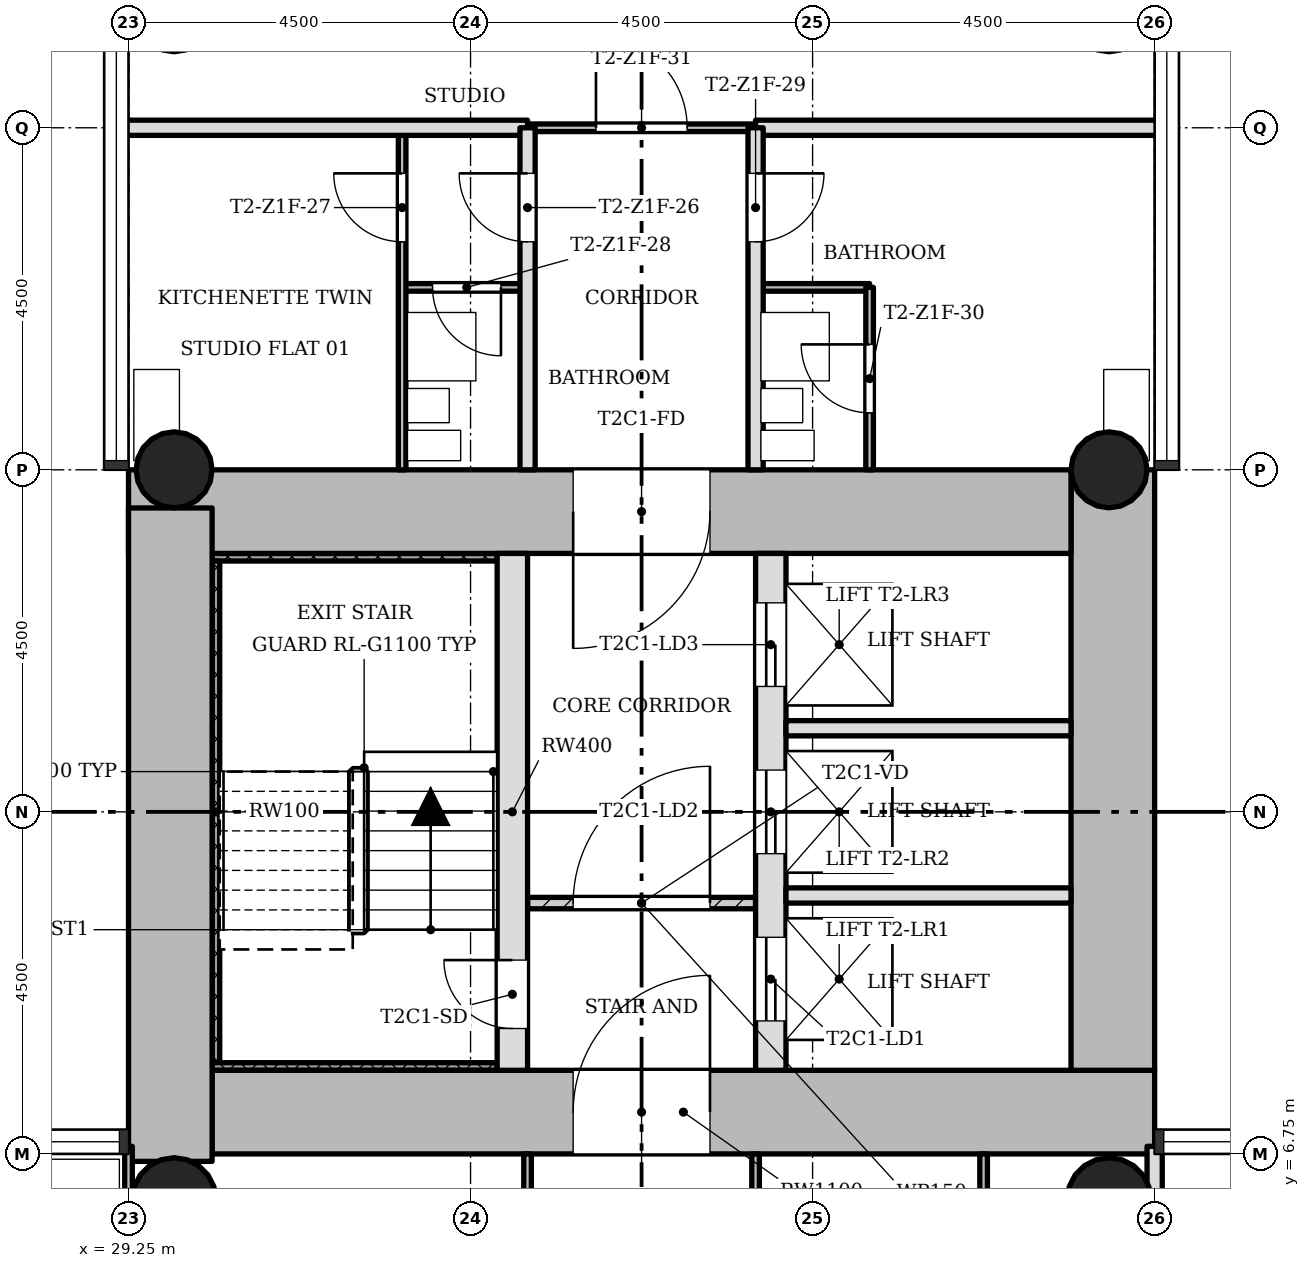
"""IFC4 building model, lengths in metres.
Left out: names, types, materials, properties, quantities, classifications, styles, units other than length and angle.
Written with IfcOpenShell. Run it as: python <this file> out.ifc"""

import sys

from ifc_helpers import new_model, si_unit, direction, frame, frame_2d, origin, origin_2d, place, context, subcontext, project, spatial, rectangle, hollow_circle, extrude, element, fill, save


model = new_model("IFC4")
c1 = context("Model", 3, precision=1e-05, world=origin(), true_north=direction((0.0, 1.0)))
c2 = subcontext(c1, "Body", "Model", "MODEL_VIEW")
j1 = project(units=[si_unit("LENGTHUNIT", "METRE"), si_unit("PLANEANGLEUNIT", "RADIAN")], contexts=[c1])
p1 = place(None, origin())
s1 = spatial("IfcSite", under=j1, at=p1, CompositionType="ELEMENT")
p2 = place(p1, origin())
s2 = spatial("IfcBuilding", under=s1, at=p2, CompositionType="ELEMENT")
p3 = place(p2, frame((0.0, 0.0, 68.7)))
s3 = spatial("IfcBuildingStorey", under=s2, at=p3, CompositionType="ELEMENT", Elevation=68.7)
p4 = place(p3, frame((30.35, 7.3, 0.0), z_axis=(0.0, 0.0, 1.0), x_axis=(1.0, 0.0, 0.0)))
e1 = element("IfcWall", 1, at=p4, inside=s3, PredefinedType="SHEAR", context=c2, shape_type="SweptSolid", body=[
    extrude(rectangle(XDim=12.4, YDim=1.1, at=frame_2d((6.2, 0.0))), origin(), (0.0, 0.0, 1.0), 3.4),
])
p5 = place(p4, frame((4.75, 0.0, 0.0)))
e2 = element("IfcOpeningElement", 2, at=p5, cuts=e1, PredefinedType="OPENING", context=c2, shape_type="SweptSolid", body=[
    extrude(rectangle(XDim=1.8, YDim=2.1, at=frame_2d((0.9, 1.05))), frame((0.0, 0.56, 0.0), z_axis=(0.0, -1.0, 0.0), x_axis=(1.0, 0.0, 0.0)), (0.0, 0.0, 1.0), 1.12),
])
p6 = place(p3, frame((42.2, 7.85, 0.0), z_axis=(0.0, 0.0, 1.0), x_axis=(0.0, 1.0, 0.0)))
e3 = element("IfcWall", 3, at=p6, inside=s3, PredefinedType="SHEAR", context=c2, shape_type="SweptSolid", body=[
    extrude(rectangle(XDim=7.9, YDim=1.1, at=frame_2d((3.95, 0.0))), origin(), (0.0, 0.0, 1.0), 3.4),
])
p7 = place(p3, frame((41.65, 15.2, 0.0), z_axis=(0.0, 0.0, 1.0), x_axis=(-1.0, 0.0, 0.0)))
e4 = element("IfcWall", 4, at=p7, inside=s3, PredefinedType="SHEAR", context=c2, shape_type="SweptSolid", body=[
    extrude(rectangle(XDim=12.4, YDim=1.1, at=frame_2d((6.2, 0.0))), origin(), (0.0, 0.0, 1.0), 3.4),
])
p8 = place(p7, frame((4.75, 0.0, 0.0)))
e5 = element("IfcOpeningElement", 5, at=p8, cuts=e4, PredefinedType="OPENING", context=c2, shape_type="SweptSolid", body=[
    extrude(rectangle(XDim=1.8, YDim=2.1, at=frame_2d((0.9, 1.05))), frame((0.0, 0.56, 0.0), z_axis=(0.0, -1.0, 0.0), x_axis=(1.0, 0.0, 0.0)), (0.0, 0.0, 1.0), 1.12),
])
p9 = place(p3, frame((29.8, 15.248, 0.0), z_axis=(0.0, 0.0, 1.0), x_axis=(0.0, -1.0, 0.0)))
e6 = element("IfcWall", 6, at=p9, inside=s3, PredefinedType="SHEAR", context=c2, shape_type="SweptSolid", body=[
    extrude(rectangle(XDim=8.596, YDim=1.1, at=frame_2d((4.298, 0.0))), origin(), (0.0, 0.0, 1.0), 3.4),
])
p10 = place(p3, frame((34.3, 7.85, 0.0), z_axis=(0.0, 0.0, 1.0), x_axis=(0.0, 1.0, 0.0)))
e7 = element("IfcWall", 7, at=p10, inside=s3, PredefinedType="SHEAR", context=c2, shape_type="SweptSolid", body=[
    extrude(rectangle(XDim=6.8, YDim=0.4, at=frame_2d((3.4, 0.0))), origin(), (0.0, 0.0, 1.0), 3.4),
])
p11 = place(p10, frame((0.55, 0.0, 0.0)))
e8 = element("IfcOpeningElement", 8, at=p11, cuts=e7, PredefinedType="OPENING", context=c2, shape_type="SweptSolid", body=[
    extrude(rectangle(XDim=0.9, YDim=2.1, at=frame_2d((0.45, 1.05))), frame((0.0, 0.21, 0.0), z_axis=(0.0, -1.0, 0.0), x_axis=(1.0, 0.0, 0.0)), (0.0, 0.0, 1.0), 0.42),
])
p12 = place(p3, frame((37.7, 7.85, 0.0), z_axis=(0.0, 0.0, 1.0), x_axis=(0.0, 1.0, 0.0)))
e9 = element("IfcWall", 9, at=p12, inside=s3, PredefinedType="SHEAR", context=c2, shape_type="SweptSolid", body=[
    extrude(rectangle(XDim=6.8, YDim=0.4, at=frame_2d((3.4, 0.0))), origin(), (0.0, 0.0, 1.0), 3.4),
])
p13 = place(p12, frame((0.65, 0.0, 0.0)))
e10 = element("IfcOpeningElement", 10, at=p13, cuts=e9, PredefinedType="OPENING", context=c2, shape_type="SweptSolid", body=[
    extrude(rectangle(XDim=1.1, YDim=2.1, at=frame_2d((0.55, 1.05))), frame((0.0, 0.21, 0.0), z_axis=(0.0, -1.0, 0.0), x_axis=(1.0, 0.0, 0.0)), (0.0, 0.0, 1.0), 0.42),
])
p14 = place(p12, frame((2.85, 0.0, 0.0)))
e11 = element("IfcOpeningElement", 11, at=p14, cuts=e9, PredefinedType="OPENING", context=c2, shape_type="SweptSolid", body=[
    extrude(rectangle(XDim=1.1, YDim=2.1, at=frame_2d((0.55, 1.05))), frame((0.0, 0.21, 0.0), z_axis=(0.0, -1.0, 0.0), x_axis=(1.0, 0.0, 0.0)), (0.0, 0.0, 1.0), 0.42),
])
p15 = place(p12, frame((5.05, 0.0, 0.0)))
e12 = element("IfcOpeningElement", 12, at=p15, cuts=e9, PredefinedType="OPENING", context=c2, shape_type="SweptSolid", body=[
    extrude(rectangle(XDim=1.1, YDim=2.1, at=frame_2d((0.55, 1.05))), frame((0.0, 0.21, 0.0), z_axis=(0.0, -1.0, 0.0), x_axis=(1.0, 0.0, 0.0)), (0.0, 0.0, 1.0), 0.42),
])
for number, where, z_axis, x_axis in (
    (13, (42.15, 15.75, 0.0), (0.0, 0.0, 1.0), (1.0, 0.0, 0.0)),
    (14, (29.85, 15.75, 0.0), (0.0, 0.0, 1.0), (1.0, 0.0, 0.0)),
):
    element("IfcColumn", number, at=place(p3, frame(where, z_axis=z_axis, x_axis=x_axis)), inside=s3, PredefinedType="COLUMN", context=c2, shape_type="SweptSolid", body=[
        extrude(hollow_circle(Radius=0.5, WallThickness=0.036, at=origin_2d()), origin(), (0.0, 0.0, 1.0), 3.4),
    ])
for number, where, z_axis, x_axis in (
    (15, (42.15, 6.15, 0.0), (0.0, 0.0, 1.0), (1.0, 0.0, 0.0)),
    (16, (29.85, 6.15, 0.0), (0.0, 0.0, 1.0), (1.0, 0.0, 0.0)),
):
    element("IfcColumn", number, at=place(p3, frame(where, z_axis=z_axis, x_axis=x_axis)), inside=s3, PredefinedType="COLUMN", context=c2, shape_type="SweptSolid", body=[
        extrude(hollow_circle(Radius=0.55, WallThickness=0.04, at=origin_2d()), origin(), (0.0, 0.0, 1.0), 3.4),
    ])
p16 = place(p3, frame((37.5, 10.05, 0.0), z_axis=(0.0, 0.0, 1.0), x_axis=(-1.0, 0.0, 0.0)))
e17 = element("IfcWall", 17, at=p16, inside=s3, PredefinedType="PARTITIONING", context=c2, shape_type="SweptSolid", body=[
    extrude(rectangle(XDim=3.0, YDim=0.15, at=frame_2d((1.5, 0.0))), origin(), (0.0, 0.0, 1.0), 3.0),
])
p17 = place(p16, frame((0.6, 0.0, 0.0)))
e18 = element("IfcOpeningElement", 18, at=p17, cuts=e17, PredefinedType="OPENING", context=c2, shape_type="SweptSolid", body=[
    extrude(rectangle(XDim=1.8, YDim=2.1, at=frame_2d((0.9, 1.05))), frame((0.0, 0.085, 0.0), z_axis=(0.0, -1.0, 0.0), x_axis=(1.0, 0.0, 0.0)), (0.0, 0.0, 1.0), 0.17),
])
for number, where, z_axis, x_axis in (
    (19, (41.65, 10.15, 0.0), (0.0, 0.0, 1.0), (-1.0, 0.0, 0.0)),
    (20, (41.65, 12.35, 0.0), (0.0, 0.0, 1.0), (-1.0, 0.0, 0.0)),
):
    element("IfcWall", number, at=place(p3, frame(where, z_axis=z_axis, x_axis=x_axis)), inside=s3, PredefinedType="SOLIDWALL", context=c2, shape_type="SweptSolid", body=[
        extrude(rectangle(XDim=3.75, YDim=0.2, at=frame_2d((1.875, 0.0))), origin(), (0.0, 0.0, 1.0), 3.0),
    ])
p18 = place(p3, frame((39.0, 18.15, 0.0), z_axis=(0.0, 0.0, 1.0), x_axis=(-1.0, 0.0, 0.0)))
e21 = element("IfcWall", 21, at=p18, inside=s3, PredefinedType="PARTITIONING", context=c2, shape_type="SweptSolid", body=[
    extrude(rectangle(XDim=1.5, YDim=0.1, at=frame_2d((0.75, 0.0))), origin(), (0.0, 0.0, 1.0), 3.0),
])
p19 = place(p3, frame((34.5, 18.15, 0.0), z_axis=(0.0, 0.0, 1.0), x_axis=(-1.0, 0.0, 0.0)))
e22 = element("IfcWall", 22, at=p19, inside=s3, PredefinedType="PARTITIONING", context=c2, shape_type="SweptSolid", body=[
    extrude(rectangle(XDim=1.65, YDim=0.1, at=frame_2d((0.825, 0.0))), origin(), (0.0, 0.0, 1.0), 3.0),
])
p20 = place(p19, frame((0.35, 0.0, 0.0)))
e23 = element("IfcOpeningElement", 23, at=p20, cuts=e22, PredefinedType="OPENING", context=c2, shape_type="SweptSolid", body=[
    extrude(rectangle(XDim=0.9, YDim=2.1, at=frame_2d((0.45, 1.05))), frame((0.0, 0.06, 0.0), z_axis=(0.0, -1.0, 0.0), x_axis=(1.0, 0.0, 0.0)), (0.0, 0.0, 1.0), 0.12),
])
p21 = place(p3, frame((37.5, 20.25, 0.0), z_axis=(0.0, 0.0, 1.0), x_axis=(-1.0, 0.0, 0.0)))
e24 = element("IfcWall", 24, at=p21, inside=s3, PredefinedType="PARTITIONING", context=c2, shape_type="SweptSolid", body=[
    extrude(rectangle(XDim=3.0, YDim=0.1, at=frame_2d((1.5, 0.0))), origin(), (0.0, 0.0, 1.0), 3.0),
])
p22 = place(p21, frame((0.9, 0.0, 0.0)))
e25 = element("IfcOpeningElement", 25, at=p22, cuts=e24, PredefinedType="OPENING", context=c2, shape_type="SweptSolid", body=[
    extrude(rectangle(XDim=1.2, YDim=2.1, at=frame_2d((0.6, 1.05))), frame((0.0, 0.06, 0.0), z_axis=(0.0, -1.0, 0.0), x_axis=(1.0, 0.0, 0.0)), (0.0, 0.0, 1.0), 0.12),
])
for number, where, z_axis, x_axis in (
    (26, (42.85, 20.25, 0.0), (0.0, 0.0, 1.0), (-1.0, 0.0, 0.0)),
    (27, (34.5, 20.25, 0.0), (0.0, 0.0, 1.0), (-1.0, 0.0, 0.0)),
):
    element("IfcWall", number, at=place(p3, frame(where, z_axis=z_axis, x_axis=x_axis)), inside=s3, PredefinedType="SOLIDWALL", context=c2, shape_type="SweptSolid", body=[
        extrude(rectangle(XDim=5.35, YDim=0.2, at=frame_2d((2.675, 0.0))), origin(), (0.0, 0.0, 1.0), 3.0),
    ])
p23 = place(p3, frame((42.75, -6.85, 0.0), z_axis=(0.0, 0.0, 1.0), x_axis=(0.0, 1.0, 0.0)))
e28 = element("IfcWall", 28, at=p23, inside=s3, PredefinedType="SOLIDWALL", context=c2, shape_type="SweptSolid", body=[
    extrude(rectangle(XDim=13.7, YDim=0.2, at=frame_2d((6.85, 0.0))), origin(), (0.0, 0.0, 1.0), 3.0),
])
p24 = place(p23, frame((6.4, 0.0, 0.0)))
e29 = element("IfcOpeningElement", 29, at=p24, cuts=e28, PredefinedType="OPENING", context=c2, shape_type="SweptSolid", body=[
    extrude(rectangle(XDim=0.9, YDim=2.1, at=frame_2d((0.45, 1.05))), frame((0.0, 0.11, 0.0), z_axis=(0.0, -1.0, 0.0), x_axis=(1.0, 0.0, 0.0)), (0.0, 0.0, 1.0), 0.22),
])
p25 = place(p3, frame((40.5, 0.9, 0.0), z_axis=(0.0, 0.0, 1.0), x_axis=(0.0, 1.0, 0.0)))
e30 = element("IfcWall", 30, at=p25, inside=s3, PredefinedType="PARTITIONING", context=c2, shape_type="SweptSolid", body=[
    extrude(rectangle(XDim=5.85, YDim=0.1, at=frame_2d((2.925, 0.0))), origin(), (0.0, 0.0, 1.0), 3.0),
])
p26 = place(p3, frame((39.0, 15.75, 0.0), z_axis=(0.0, 0.0, 1.0), x_axis=(0.0, 1.0, 0.0)))
e31 = element("IfcWall", 31, at=p26, inside=s3, PredefinedType="PARTITIONING", context=c2, shape_type="SweptSolid", body=[
    extrude(rectangle(XDim=2.4, YDim=0.1, at=frame_2d((1.2, 0.0))), origin(), (0.0, 0.0, 1.0), 3.0),
])
p27 = place(p26, frame((0.75, 0.0, 0.0)))
e32 = element("IfcOpeningElement", 32, at=p27, cuts=e31, PredefinedType="OPENING", context=c2, shape_type="SweptSolid", body=[
    extrude(rectangle(XDim=0.9, YDim=2.1, at=frame_2d((0.45, 1.05))), frame((0.0, 0.06, 0.0), z_axis=(0.0, -1.0, 0.0), x_axis=(1.0, 0.0, 0.0)), (0.0, 0.0, 1.0), 0.12),
])
p28 = place(p3, frame((37.5, 0.9, 0.0), z_axis=(0.0, 0.0, 1.0), x_axis=(0.0, 1.0, 0.0)))
e33 = element("IfcWall", 33, at=p28, inside=s3, PredefinedType="PARTITIONING", context=c2, shape_type="SweptSolid", body=[
    extrude(rectangle(XDim=5.85, YDim=0.1, at=frame_2d((2.925, 0.0))), origin(), (0.0, 0.0, 1.0), 3.0),
])
p29 = place(p28, frame((2.475, 0.0, 0.0)))
e34 = element("IfcOpeningElement", 34, at=p29, cuts=e33, PredefinedType="OPENING", context=c2, shape_type="SweptSolid", body=[
    extrude(rectangle(XDim=0.9, YDim=2.1, at=frame_2d((0.45, 1.05))), frame((0.0, 0.06, 0.0), z_axis=(0.0, -1.0, 0.0), x_axis=(1.0, 0.0, 0.0)), (0.0, 0.0, 1.0), 0.12),
])
p30 = place(p3, frame((37.5, 15.75, 0.0), z_axis=(0.0, 0.0, 1.0), x_axis=(0.0, 1.0, 0.0)))
e35 = element("IfcWall", 35, at=p30, inside=s3, PredefinedType="SOLIDWALL", context=c2, shape_type="SweptSolid", body=[
    extrude(rectangle(XDim=4.5, YDim=0.2, at=frame_2d((2.25, 0.0))), origin(), (0.0, 0.0, 1.0), 3.0),
])
p31 = place(p30, frame((3.0, 0.0, 0.0)))
e36 = element("IfcOpeningElement", 36, at=p31, cuts=e35, PredefinedType="OPENING", context=c2, shape_type="SweptSolid", body=[
    extrude(rectangle(XDim=0.9, YDim=2.1, at=frame_2d((0.45, 1.05))), frame((0.0, 0.11, 0.0), z_axis=(0.0, -1.0, 0.0), x_axis=(1.0, 0.0, 0.0)), (0.0, 0.0, 1.0), 0.22),
])
p32 = place(p3, frame((34.5, 0.9, 0.0), z_axis=(0.0, 0.0, 1.0), x_axis=(0.0, 1.0, 0.0)))
e37 = element("IfcWall", 37, at=p32, inside=s3, PredefinedType="PARTITIONING", context=c2, shape_type="SweptSolid", body=[
    extrude(rectangle(XDim=5.85, YDim=0.1, at=frame_2d((2.925, 0.0))), origin(), (0.0, 0.0, 1.0), 3.0),
])
p33 = place(p32, frame((3.675, 0.0, 0.0)))
e38 = element("IfcOpeningElement", 38, at=p33, cuts=e37, PredefinedType="OPENING", context=c2, shape_type="SweptSolid", body=[
    extrude(rectangle(XDim=0.9, YDim=2.1, at=frame_2d((0.45, 1.05))), frame((0.0, 0.06, 0.0), z_axis=(0.0, -1.0, 0.0), x_axis=(1.0, 0.0, 0.0)), (0.0, 0.0, 1.0), 0.12),
])
p34 = place(p3, frame((34.5, 15.75, 0.0), z_axis=(0.0, 0.0, 1.0), x_axis=(0.0, 1.0, 0.0)))
e39 = element("IfcWall", 39, at=p34, inside=s3, PredefinedType="SOLIDWALL", context=c2, shape_type="SweptSolid", body=[
    extrude(rectangle(XDim=4.5, YDim=0.2, at=frame_2d((2.25, 0.0))), origin(), (0.0, 0.0, 1.0), 3.0),
])
p35 = place(p34, frame((3.0, 0.0, 0.0)))
e40 = element("IfcOpeningElement", 40, at=p35, cuts=e39, PredefinedType="OPENING", context=c2, shape_type="SweptSolid", body=[
    extrude(rectangle(XDim=0.9, YDim=2.1, at=frame_2d((0.45, 1.05))), frame((0.0, 0.11, 0.0), z_axis=(0.0, -1.0, 0.0), x_axis=(1.0, 0.0, 0.0)), (0.0, 0.0, 1.0), 0.22),
])
p36 = place(p3, frame((32.85, 15.75, 0.0), z_axis=(0.0, 0.0, 1.0), x_axis=(0.0, 1.0, 0.0)))
e41 = element("IfcWall", 41, at=p36, inside=s3, PredefinedType="PARTITIONING", context=c2, shape_type="SweptSolid", body=[
    extrude(rectangle(XDim=4.5, YDim=0.1, at=frame_2d((2.25, 0.0))), origin(), (0.0, 0.0, 1.0), 3.0),
])
p37 = place(p36, frame((3.0, 0.0, 0.0)))
e42 = element("IfcOpeningElement", 42, at=p37, cuts=e41, PredefinedType="OPENING", context=c2, shape_type="SweptSolid", body=[
    extrude(rectangle(XDim=0.9, YDim=2.1, at=frame_2d((0.45, 1.05))), frame((0.0, 0.06, 0.0), z_axis=(0.0, -1.0, 0.0), x_axis=(1.0, 0.0, 0.0)), (0.0, 0.0, 1.0), 0.12),
])
p38 = place(p3, frame((29.25, 0.9, 0.0), z_axis=(0.0, 0.0, 1.0), x_axis=(0.0, 1.0, 0.0)))
e43 = element("IfcWall", 43, at=p38, inside=s3, PredefinedType="PARTITIONING", context=c2, shape_type="SweptSolid", body=[
    extrude(rectangle(XDim=5.95, YDim=0.1, at=frame_2d((2.975, 0.0))), origin(), (0.0, 0.0, 1.0), 3.0),
])
p39 = place(p3, frame((34.1, 14.6, 0.0), z_axis=(0.0, 0.0, 1.0), x_axis=(-1.0, 0.0, 0.0)))
e44 = element("IfcWall", 44, at=p39, inside=s3, PredefinedType="SHEAR", context=c2, shape_type="SweptSolid", body=[
    extrude(rectangle(XDim=3.75, YDim=0.1, at=frame_2d((1.875, 0.0))), origin(), (0.0, 0.0, 1.0), 3.4),
])
p40 = place(p3, frame((30.4, 7.95, 0.0), z_axis=(0.0, 0.0, 1.0), x_axis=(0.0, 1.0, 0.0)))
e45 = element("IfcWall", 45, at=p40, inside=s3, PredefinedType="SHEAR", context=c2, shape_type="SweptSolid", body=[
    extrude(rectangle(XDim=6.6, YDim=0.1, at=frame_2d((3.3, 0.0))), origin(), (0.0, 0.0, 1.0), 3.4),
])
p41 = place(p3, frame((34.1, 7.9, 0.0), z_axis=(0.0, 0.0, 1.0), x_axis=(-1.0, 0.0, 0.0)))
e46 = element("IfcWall", 46, at=p41, inside=s3, PredefinedType="SHEAR", context=c2, shape_type="SweptSolid", body=[
    extrude(rectangle(XDim=3.75, YDim=0.1, at=frame_2d((1.875, 0.0))), origin(), (0.0, 0.0, 1.0), 3.4),
])
p42 = place(p17, origin())
e47 = element("IfcDoor", 47, at=p42, inside=s3, OperationType="SINGLE_SWING_LEFT", PredefinedType="DOOR", context=c2, shape_type="SweptSolid", body=[
    extrude(rectangle(XDim=1.8, YDim=2.1, at=frame_2d((0.9, 1.05))), frame((0.0, 0.025, 0.0), z_axis=(0.0, -1.0, 0.0), x_axis=(1.0, 0.0, 0.0)), (0.0, 0.0, 1.0), 0.05),
])
fill(e18, e47)
p43 = place(p35, origin())
e48 = element("IfcDoor", 48, at=p43, inside=s3, OperationType="SINGLE_SWING_LEFT", PredefinedType="DOOR", context=c2, shape_type="SweptSolid", body=[
    extrude(rectangle(XDim=0.9, YDim=2.1, at=frame_2d((0.45, 1.05))), frame((0.0, 0.025, 0.0), z_axis=(0.0, -1.0, 0.0), x_axis=(1.0, 0.0, 0.0)), (0.0, 0.0, 1.0), 0.05),
])
fill(e40, e48)
p44 = place(p37, origin())
e49 = element("IfcDoor", 49, at=p44, inside=s3, OperationType="SINGLE_SWING_LEFT", PredefinedType="DOOR", context=c2, shape_type="SweptSolid", body=[
    extrude(rectangle(XDim=0.9, YDim=2.1, at=frame_2d((0.45, 1.05))), frame((0.0, 0.025, 0.0), z_axis=(0.0, -1.0, 0.0), x_axis=(1.0, 0.0, 0.0)), (0.0, 0.0, 1.0), 0.05),
])
fill(e42, e49)
p45 = place(p20, origin())
e50 = element("IfcDoor", 50, at=p45, inside=s3, OperationType="SINGLE_SWING_RIGHT", PredefinedType="DOOR", context=c2, shape_type="SweptSolid", body=[
    extrude(rectangle(XDim=0.9, YDim=2.1, at=frame_2d((0.45, 1.05))), frame((0.0, 0.025, 0.0), z_axis=(0.0, -1.0, 0.0), x_axis=(1.0, 0.0, 0.0)), (0.0, 0.0, 1.0), 0.05),
])
fill(e23, e50)
p46 = place(p31, origin())
e51 = element("IfcDoor", 51, at=p46, inside=s3, OperationType="SINGLE_SWING_RIGHT", PredefinedType="DOOR", context=c2, shape_type="SweptSolid", body=[
    extrude(rectangle(XDim=0.9, YDim=2.1, at=frame_2d((0.45, 1.05))), frame((0.0, 0.025, 0.0), z_axis=(0.0, -1.0, 0.0), x_axis=(1.0, 0.0, 0.0)), (0.0, 0.0, 1.0), 0.05),
])
fill(e36, e51)
p47 = place(p27, origin())
e52 = element("IfcDoor", 52, at=p47, inside=s3, OperationType="SINGLE_SWING_LEFT", PredefinedType="DOOR", context=c2, shape_type="SweptSolid", body=[
    extrude(rectangle(XDim=0.9, YDim=2.1, at=frame_2d((0.45, 1.05))), frame((0.0, 0.025, 0.0), z_axis=(0.0, -1.0, 0.0), x_axis=(1.0, 0.0, 0.0)), (0.0, 0.0, 1.0), 0.05),
])
fill(e32, e52)
p48 = place(p22, origin())
e53 = element("IfcDoor", 53, at=p48, inside=s3, OperationType="SINGLE_SWING_RIGHT", PredefinedType="DOOR", context=c2, shape_type="SweptSolid", body=[
    extrude(rectangle(XDim=1.2, YDim=2.1, at=frame_2d((0.6, 1.05))), frame((0.0, 0.025, 0.0), z_axis=(0.0, -1.0, 0.0), x_axis=(1.0, 0.0, 0.0)), (0.0, 0.0, 1.0), 0.05),
])
fill(e25, e53)
p49 = place(p11, origin())
e54 = element("IfcDoor", 54, at=p49, inside=s3, OperationType="SINGLE_SWING_LEFT", PredefinedType="DOOR", context=c2, shape_type="SweptSolid", body=[
    extrude(rectangle(XDim=0.9, YDim=2.1, at=frame_2d((0.45, 1.05))), frame((0.0, 0.025, 0.0), z_axis=(0.0, -1.0, 0.0), x_axis=(1.0, 0.0, 0.0)), (0.0, 0.0, 1.0), 0.05),
])
fill(e8, e54)
p50 = place(p13, origin())
e55 = element("IfcDoor", 55, at=p50, inside=s3, OperationType="SLIDING_TO_LEFT", PredefinedType="DOOR", context=c2, shape_type="SweptSolid", body=[
    extrude(rectangle(XDim=1.1, YDim=2.1, at=frame_2d((0.55, 1.05))), frame((0.0, 0.025, 0.0), z_axis=(0.0, -1.0, 0.0), x_axis=(1.0, 0.0, 0.0)), (0.0, 0.0, 1.0), 0.05),
])
fill(e10, e55)
p51 = place(p14, origin())
e56 = element("IfcDoor", 56, at=p51, inside=s3, OperationType="SLIDING_TO_LEFT", PredefinedType="DOOR", context=c2, shape_type="SweptSolid", body=[
    extrude(rectangle(XDim=1.1, YDim=2.1, at=frame_2d((0.55, 1.05))), frame((0.0, 0.025, 0.0), z_axis=(0.0, -1.0, 0.0), x_axis=(1.0, 0.0, 0.0)), (0.0, 0.0, 1.0), 0.05),
])
fill(e11, e56)
p52 = place(p15, origin())
e57 = element("IfcDoor", 57, at=p52, inside=s3, OperationType="SLIDING_TO_LEFT", PredefinedType="DOOR", context=c2, shape_type="SweptSolid", body=[
    extrude(rectangle(XDim=1.1, YDim=2.1, at=frame_2d((0.55, 1.05))), frame((0.0, 0.025, 0.0), z_axis=(0.0, -1.0, 0.0), x_axis=(1.0, 0.0, 0.0)), (0.0, 0.0, 1.0), 0.05),
])
fill(e12, e57)
p53 = place(p5, origin())
e58 = element("IfcDoor", 58, at=p53, inside=s3, OperationType="SINGLE_SWING_LEFT", PredefinedType="DOOR", context=c2, shape_type="SweptSolid", body=[
    extrude(rectangle(XDim=1.8, YDim=2.1, at=frame_2d((0.9, 1.05))), frame((0.0, 0.025, 0.0), z_axis=(0.0, -1.0, 0.0), x_axis=(1.0, 0.0, 0.0)), (0.0, 0.0, 1.0), 0.05),
])
fill(e2, e58)
p54 = place(p8, origin())
e59 = element("IfcDoor", 59, at=p54, inside=s3, OperationType="SINGLE_SWING_LEFT", PredefinedType="DOOR", context=c2, shape_type="SweptSolid", body=[
    extrude(rectangle(XDim=1.8, YDim=2.1, at=frame_2d((0.9, 1.05))), frame((0.0, 0.025, 0.0), z_axis=(0.0, -1.0, 0.0), x_axis=(1.0, 0.0, 0.0)), (0.0, 0.0, 1.0), 0.05),
])
fill(e5, e59)
save(model, sys.argv[1])
